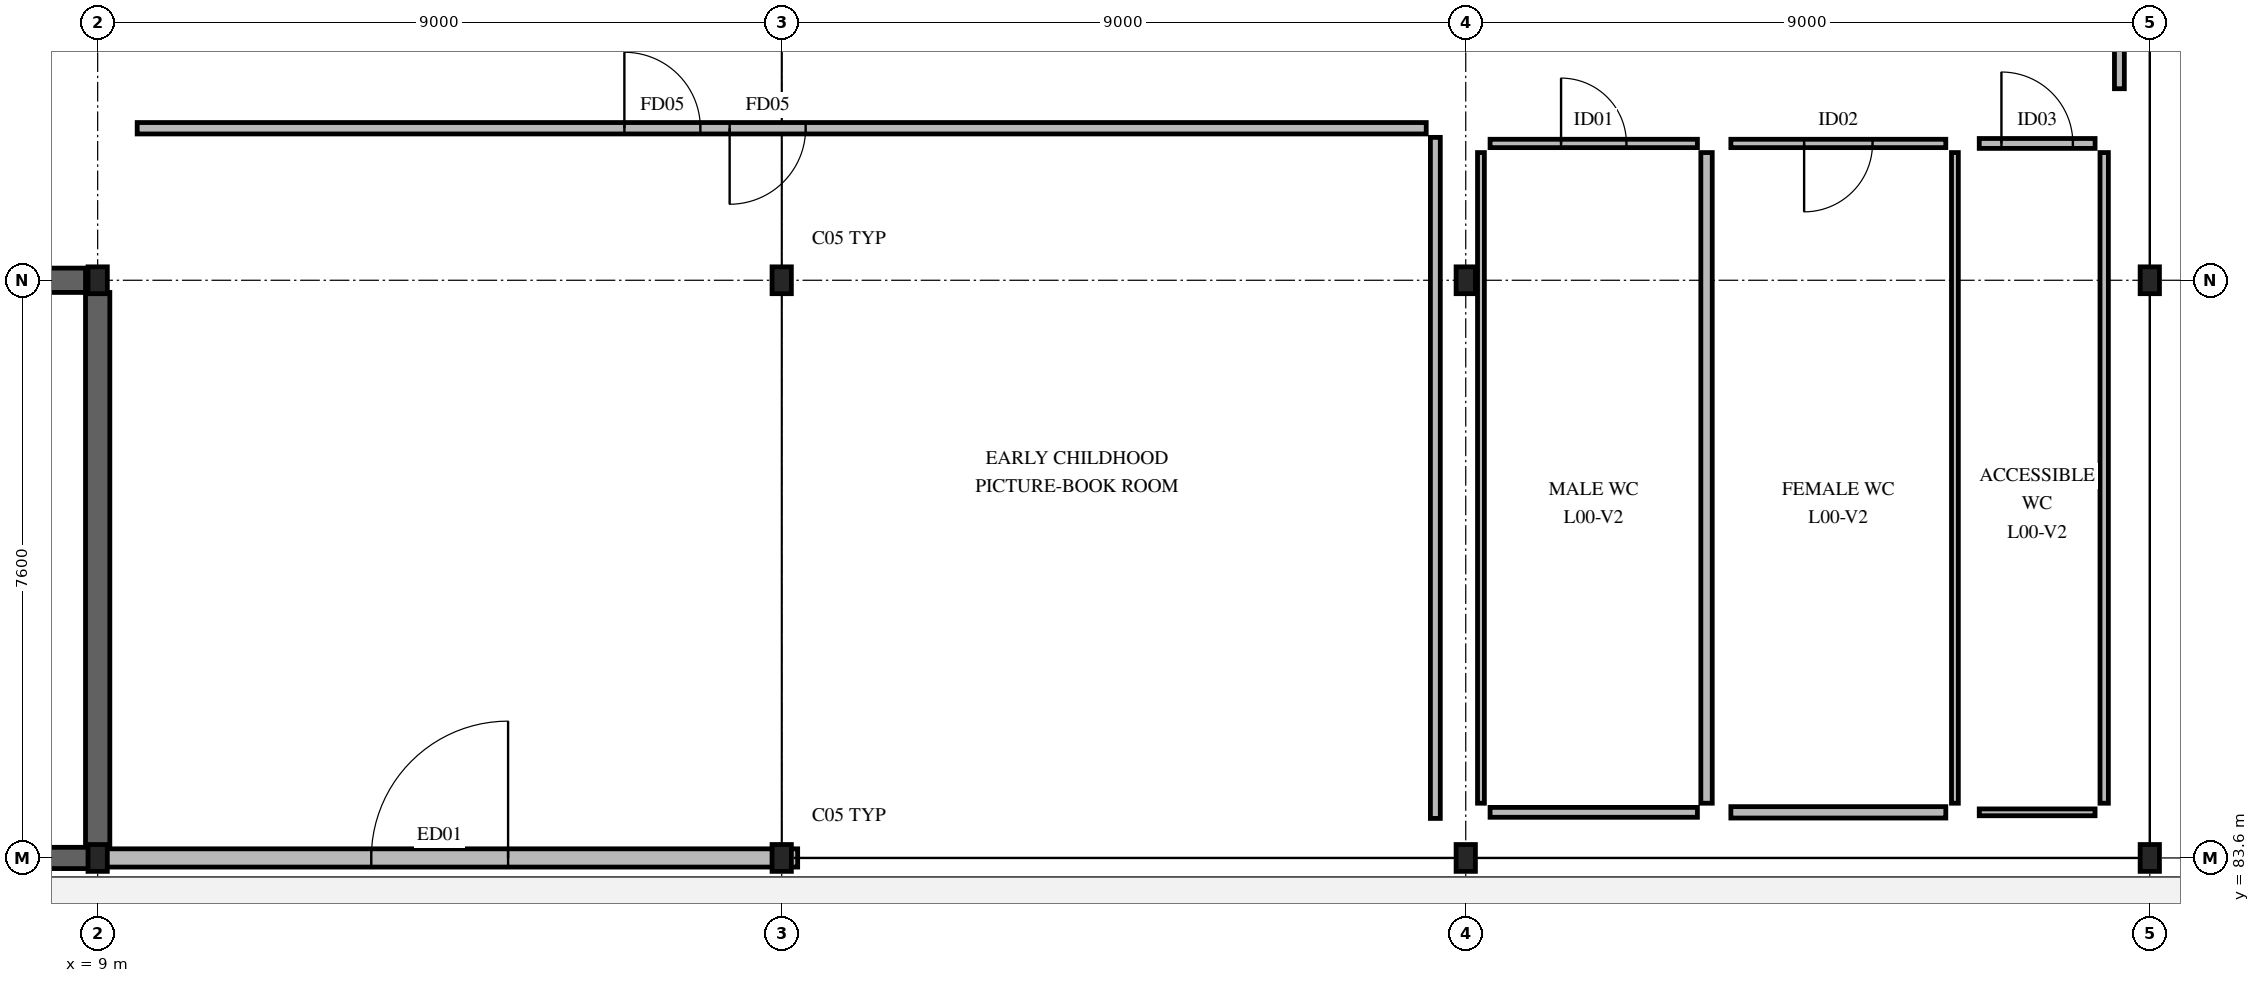
"""IFC4 building model, lengths in metres.
Left out: names, types, materials, properties, quantities, classifications, styles, units other than length and angle.
Written with IfcOpenShell. Run it as: python <this file> out.ifc"""

import sys

from ifc_helpers import new_model, si_unit, direction, frame, frame_2d, origin, origin_2d, place, context, subcontext, project, spatial, rectangle, i_section, extrude, element, fill, save


model = new_model("IFC4")
c1 = context("Model", 3, precision=1e-05, world=origin(), true_north=direction((0.0, 1.0)))
c2 = subcontext(c1, "Body", "Model", "MODEL_VIEW")
j1 = project(units=[si_unit("LENGTHUNIT", "METRE"), si_unit("PLANEANGLEUNIT", "RADIAN")], contexts=[c1])
p1 = place(None, origin())
s1 = spatial("IfcSite", under=j1, at=p1, CompositionType="ELEMENT")
p2 = place(p1, origin())
s2 = spatial("IfcBuilding", under=s1, at=p2, CompositionType="ELEMENT")
p3 = place(p2, origin())
s3 = spatial("IfcBuildingStorey", under=s2, at=p3, CompositionType="ELEMENT", Elevation=0.0)
for number, where, z_axis, x_axis in (
    (1, (9.0, 83.6, 0.0), (0.0, 0.0, 1.0), (1.0, 0.0, 0.0)),
    (2, (9.0, 91.2, 0.0), (0.0, 0.0, 1.0), (1.0, 0.0, 0.0)),
    (3, (18.0, 83.6, 0.0), (0.0, 0.0, 1.0), (1.0, 0.0, 0.0)),
    (4, (18.0, 91.2, 0.0), (0.0, 0.0, 1.0), (1.0, 0.0, 0.0)),
    (5, (27.0, 83.6, 0.0), (0.0, 0.0, 1.0), (1.0, 0.0, 0.0)),
    (6, (27.0, 91.2, 0.0), (0.0, 0.0, 1.0), (1.0, 0.0, 0.0)),
    (7, (36.0, 83.6, 0.0), (0.0, 0.0, 1.0), (1.0, 0.0, 0.0)),
    (8, (36.0, 91.2, 0.0), (0.0, 0.0, 1.0), (1.0, 0.0, 0.0)),
):
    element("IfcColumn", number, at=place(p3, frame(where, z_axis=z_axis, x_axis=x_axis)), inside=s3, PredefinedType="COLUMN", context=c2, shape_type="SweptSolid", body=[
        extrude(i_section(OverallWidth=0.254, OverallDepth=0.353, WebThickness=0.01, FlangeThickness=0.016, FilletRadius=0.015, at=origin_2d()), origin(), (0.0, 0.0, 1.0), 5.04),
    ])
p4 = place(p3, frame((0.0, 83.6, 0.0), z_axis=(0.0, 0.0, 1.0), x_axis=(1.0, 0.0, 0.0)))
e9 = element("IfcWall", 9, at=p4, inside=s3, PredefinedType="SOLIDWALL", context=c2, shape_type="SweptSolid", body=[
    extrude(rectangle(XDim=9.0, YDim=0.28, at=frame_2d((4.5, 0.0))), origin(), (0.0, 0.0, 1.0), 4.8),
])
p5 = place(p4, frame((0.32, 0.0, 0.0)))
e10 = element("IfcOpeningElement", 10, at=p5, cuts=e9, PredefinedType="OPENING", context=c2, shape_type="SweptSolid", body=[
    extrude(rectangle(XDim=1.15, YDim=2.2, at=frame_2d((0.575, 1.1))), frame((0.0, 0.15, 0.0), z_axis=(0.0, -1.0, 0.0), x_axis=(1.0, 0.0, 0.0)), (0.0, 0.0, 1.0), 0.3),
])
p6 = place(p3, frame((9.0, 83.6, 0.0), z_axis=(0.0, 0.0, 1.0), x_axis=(1.0, 0.0, 0.0)))
e11 = element("IfcWall", 11, at=p6, inside=s3, PredefinedType="STANDARD", context=c2, shape_type="SweptSolid", body=[
    extrude(rectangle(XDim=9.21, YDim=0.24, at=frame_2d((4.605, 0.0))), origin(), (0.0, 0.0, 1.0), 4.371),
])
p7 = place(p6, frame((3.6, 0.0, 0.0)))
e12 = element("IfcOpeningElement", 12, at=p7, cuts=e11, PredefinedType="OPENING", context=c2, shape_type="SweptSolid", body=[
    extrude(rectangle(XDim=1.8, YDim=2.25, at=frame_2d((0.9, 1.125))), frame((0.0, 0.13, 0.0), z_axis=(0.0, -1.0, 0.0), x_axis=(1.0, 0.0, 0.0)), (0.0, 0.0, 1.0), 0.26),
])
p8 = place(p3, frame((0.16, 91.2, 0.0), z_axis=(0.0, 0.0, 1.0), x_axis=(1.0, 0.0, 0.0)))
e13 = element("IfcWall", 13, at=p8, inside=s3, PredefinedType="SHEAR", context=c2, shape_type="SweptSolid", body=[
    extrude(rectangle(XDim=8.68, YDim=0.32, at=frame_2d((4.34, 0.0))), origin(), (0.0, 0.0, 1.0), 4.76),
])
p9 = place(p8, frame((2.2, 0.0, 0.0)))
e14 = element("IfcOpeningElement", 14, at=p9, cuts=e13, PredefinedType="OPENING", context=c2, shape_type="SweptSolid", body=[
    extrude(rectangle(XDim=1.0, YDim=2.15, at=frame_2d((0.5, 1.075))), frame((0.0, 0.17, 0.0), z_axis=(0.0, -1.0, 0.0), x_axis=(1.0, 0.0, 0.0)), (0.0, 0.0, 1.0), 0.34),
])
p10 = place(p3, frame((9.0, 83.76, 0.0), z_axis=(0.0, 0.0, 1.0), x_axis=(0.0, 1.0, 0.0)))
e15 = element("IfcWall", 15, at=p10, inside=s3, PredefinedType="SHEAR", context=c2, shape_type="SweptSolid", body=[
    extrude(rectangle(XDim=7.28, YDim=0.32, at=frame_2d((3.64, 0.0))), origin(), (0.0, 0.0, 1.0), 4.76),
])
p11 = place(p3, frame((9.52, 93.2, 0.0), z_axis=(0.0, 0.0, 1.0), x_axis=(1.0, 0.0, 0.0)))
e16 = element("IfcWall", 16, at=p11, inside=s3, PredefinedType="PARTITIONING", context=c2, shape_type="SweptSolid", body=[
    extrude(rectangle(XDim=16.96, YDim=0.15, at=frame_2d((8.48, 0.0))), origin(), (0.0, 0.0, 1.0), 4.76),
])
p12 = place(p11, frame((7.795, 0.0, 0.0)))
e17 = element("IfcOpeningElement", 17, at=p12, cuts=e16, PredefinedType="OPENING", context=c2, shape_type="SweptSolid", body=[
    extrude(rectangle(XDim=1.0, YDim=2.15, at=frame_2d((0.5, 1.075))), frame((0.0, 0.085, 0.0), z_axis=(0.0, -1.0, 0.0), x_axis=(1.0, 0.0, 0.0)), (0.0, 0.0, 1.0), 0.17),
])
p13 = place(p11, frame((6.41, 0.0, 0.0)))
e18 = element("IfcOpeningElement", 18, at=p13, cuts=e16, PredefinedType="OPENING", context=c2, shape_type="SweptSolid", body=[
    extrude(rectangle(XDim=1.0, YDim=2.15, at=frame_2d((0.5, 1.075))), frame((0.0, 0.085, 0.0), z_axis=(0.0, -1.0, 0.0), x_axis=(1.0, 0.0, 0.0)), (0.0, 0.0, 1.0), 0.17),
])
p14 = place(p3, frame((26.6, 84.12, 0.0), z_axis=(0.0, 0.0, 1.0), x_axis=(0.0, 1.0, 0.0)))
e19 = element("IfcWall", 19, at=p14, inside=s3, PredefinedType="PARTITIONING", context=c2, shape_type="SweptSolid", body=[
    extrude(rectangle(XDim=8.96, YDim=0.13, at=frame_2d((4.48, 0.0))), origin(), (0.0, 0.0, 1.0), 4.76),
])
p15 = place(p3, frame((27.32, 93.0, 0.0), z_axis=(0.0, 0.0, 1.0), x_axis=(1.0, 0.0, 0.0)))
e20 = element("IfcWall", 20, at=p15, inside=s3, PredefinedType="PARTITIONING", context=c2, shape_type="SweptSolid", body=[
    extrude(rectangle(XDim=2.728, YDim=0.11, at=frame_2d((1.364, 0.0))), origin(), (0.0, 0.0, 1.0), 4.76),
])
p16 = place(p15, frame((0.934, 0.0, 0.0)))
e21 = element("IfcOpeningElement", 21, at=p16, cuts=e20, PredefinedType="OPENING", context=c2, shape_type="SweptSolid", body=[
    extrude(rectangle(XDim=0.86, YDim=2.06, at=frame_2d((0.43, 1.03))), frame((0.0, 0.065, 0.0), z_axis=(0.0, -1.0, 0.0), x_axis=(1.0, 0.0, 0.0)), (0.0, 0.0, 1.0), 0.13),
])
p17 = place(p3, frame((27.2, 84.32, 0.0), z_axis=(0.0, 0.0, 1.0), x_axis=(0.0, 1.0, 0.0)))
e22 = element("IfcWall", 22, at=p17, inside=s3, PredefinedType="PARTITIONING", context=c2, shape_type="SweptSolid", body=[
    extrude(rectangle(XDim=8.56, YDim=0.09, at=frame_2d((4.28, 0.0))), origin(), (0.0, 0.0, 1.0), 4.76),
])
p18 = place(p3, frame((30.168, 84.32, 0.0), z_axis=(0.0, 0.0, 1.0), x_axis=(0.0, 1.0, 0.0)))
e23 = element("IfcWall", 23, at=p18, inside=s3, PredefinedType="PARTITIONING", context=c2, shape_type="SweptSolid", body=[
    extrude(rectangle(XDim=8.56, YDim=0.15, at=frame_2d((4.28, 0.0))), origin(), (0.0, 0.0, 1.0), 4.76),
])
p19 = place(p3, frame((27.32, 84.2, 0.0), z_axis=(0.0, 0.0, 1.0), x_axis=(1.0, 0.0, 0.0)))
e24 = element("IfcWall", 24, at=p19, inside=s3, PredefinedType="PARTITIONING", context=c2, shape_type="SweptSolid", body=[
    extrude(rectangle(XDim=2.728, YDim=0.13, at=frame_2d((1.364, 0.0))), origin(), (0.0, 0.0, 1.0), 4.76),
])
p20 = place(p3, frame((30.488, 93.0, 0.0), z_axis=(0.0, 0.0, 1.0), x_axis=(1.0, 0.0, 0.0)))
e25 = element("IfcWall", 25, at=p20, inside=s3, PredefinedType="PARTITIONING", context=c2, shape_type="SweptSolid", body=[
    extrude(rectangle(XDim=2.828, YDim=0.11, at=frame_2d((1.414, 0.0))), origin(), (0.0, 0.0, 1.0), 4.76),
])
p21 = place(p20, frame((0.964, 0.0, 0.0)))
e26 = element("IfcOpeningElement", 26, at=p21, cuts=e25, PredefinedType="OPENING", context=c2, shape_type="SweptSolid", body=[
    extrude(rectangle(XDim=0.9, YDim=2.06, at=frame_2d((0.45, 1.03))), frame((0.0, 0.065, 0.0), z_axis=(0.0, -1.0, 0.0), x_axis=(1.0, 0.0, 0.0)), (0.0, 0.0, 1.0), 0.13),
])
p22 = place(p3, frame((33.436, 84.32, 0.0), z_axis=(0.0, 0.0, 1.0), x_axis=(0.0, 1.0, 0.0)))
e27 = element("IfcWall", 27, at=p22, inside=s3, PredefinedType="PARTITIONING", context=c2, shape_type="SweptSolid", body=[
    extrude(rectangle(XDim=8.56, YDim=0.09, at=frame_2d((4.28, 0.0))), origin(), (0.0, 0.0, 1.0), 4.76),
])
p23 = place(p3, frame((30.488, 84.2, 0.0), z_axis=(0.0, 0.0, 1.0), x_axis=(1.0, 0.0, 0.0)))
e28 = element("IfcWall", 28, at=p23, inside=s3, PredefinedType="PARTITIONING", context=c2, shape_type="SweptSolid", body=[
    extrude(rectangle(XDim=2.828, YDim=0.15, at=frame_2d((1.414, 0.0))), origin(), (0.0, 0.0, 1.0), 4.76),
])
p24 = place(p3, frame((33.756, 93.0, 0.0), z_axis=(0.0, 0.0, 1.0), x_axis=(1.0, 0.0, 0.0)))
e29 = element("IfcWall", 29, at=p24, inside=s3, PredefinedType="PARTITIONING", context=c2, shape_type="SweptSolid", body=[
    extrude(rectangle(XDim=1.524, YDim=0.13, at=frame_2d((0.762, 0.0))), origin(), (0.0, 0.0, 1.0), 4.76),
])
p25 = place(p24, frame((0.292, 0.0, 0.0)))
e30 = element("IfcOpeningElement", 30, at=p25, cuts=e29, PredefinedType="OPENING", context=c2, shape_type="SweptSolid", body=[
    extrude(rectangle(XDim=0.94, YDim=2.06, at=frame_2d((0.47, 1.03))), frame((0.0, 0.075, 0.0), z_axis=(0.0, -1.0, 0.0), x_axis=(1.0, 0.0, 0.0)), (0.0, 0.0, 1.0), 0.15),
])
p26 = place(p3, frame((35.4, 84.32, 0.0), z_axis=(0.0, 0.0, 1.0), x_axis=(0.0, 1.0, 0.0)))
e31 = element("IfcWall", 31, at=p26, inside=s3, PredefinedType="PARTITIONING", context=c2, shape_type="SweptSolid", body=[
    extrude(rectangle(XDim=8.56, YDim=0.11, at=frame_2d((4.28, 0.0))), origin(), (0.0, 0.0, 1.0), 4.76),
])
p27 = place(p3, frame((33.756, 84.2, 0.0), z_axis=(0.0, 0.0, 1.0), x_axis=(1.0, 0.0, 0.0)))
e32 = element("IfcWall", 32, at=p27, inside=s3, PredefinedType="PARTITIONING", context=c2, shape_type="SweptSolid", body=[
    extrude(rectangle(XDim=1.524, YDim=0.09, at=frame_2d((0.762, 0.0))), origin(), (0.0, 0.0, 1.0), 4.76),
])
p28 = place(p3, frame((35.6, 93.72, 0.0), z_axis=(0.0, 0.0, 1.0), x_axis=(0.0, 1.0, 0.0)))
e33 = element("IfcWall", 33, at=p28, inside=s3, PredefinedType="PARTITIONING", context=c2, shape_type="SweptSolid", body=[
    extrude(rectangle(XDim=2.56, YDim=0.13, at=frame_2d((1.28, 0.0))), origin(), (0.0, 0.0, 1.0), 4.76),
])
p29 = place(p7, frame((1.8, 0.0, 0.0), z_axis=(0.0, 0.0, 1.0), x_axis=(-1.0, 0.0, 0.0)))
e34 = element("IfcDoor", 34, at=p29, inside=s3, OperationType="SINGLE_SWING_LEFT", PredefinedType="DOOR", context=c2, shape_type="SweptSolid", body=[
    extrude(rectangle(XDim=1.8, YDim=2.25, at=frame_2d((0.9, 1.125))), frame((0.0, 0.025, 0.0), z_axis=(0.0, -1.0, 0.0), x_axis=(1.0, 0.0, 0.0)), (0.0, 0.0, 1.0), 0.05),
])
fill(e12, e34)
p30 = place(p12, origin())
e35 = element("IfcDoor", 35, at=p30, inside=s3, OperationType="SINGLE_SWING_RIGHT", PredefinedType="DOOR", context=c2, shape_type="SweptSolid", body=[
    extrude(rectangle(XDim=1.0, YDim=2.15, at=frame_2d((0.5, 1.075))), frame((0.0, 0.025, 0.0), z_axis=(0.0, -1.0, 0.0), x_axis=(1.0, 0.0, 0.0)), (0.0, 0.0, 1.0), 0.05),
])
fill(e17, e35)
p31 = place(p16, origin())
e36 = element("IfcDoor", 36, at=p31, inside=s3, OperationType="SINGLE_SWING_LEFT", PredefinedType="DOOR", context=c2, shape_type="SweptSolid", body=[
    extrude(rectangle(XDim=0.86, YDim=2.06, at=frame_2d((0.43, 1.03))), frame((0.0, 0.025, 0.0), z_axis=(0.0, -1.0, 0.0), x_axis=(1.0, 0.0, 0.0)), (0.0, 0.0, 1.0), 0.05),
])
fill(e21, e36)
p32 = place(p21, origin())
e37 = element("IfcDoor", 37, at=p32, inside=s3, OperationType="SINGLE_SWING_RIGHT", PredefinedType="DOOR", context=c2, shape_type="SweptSolid", body=[
    extrude(rectangle(XDim=0.9, YDim=2.06, at=frame_2d((0.45, 1.03))), frame((0.0, 0.025, 0.0), z_axis=(0.0, -1.0, 0.0), x_axis=(1.0, 0.0, 0.0)), (0.0, 0.0, 1.0), 0.05),
])
fill(e26, e37)
p33 = place(p25, origin())
e38 = element("IfcDoor", 38, at=p33, inside=s3, OperationType="SINGLE_SWING_LEFT", PredefinedType="DOOR", context=c2, shape_type="SweptSolid", body=[
    extrude(rectangle(XDim=0.94, YDim=2.06, at=frame_2d((0.47, 1.03))), frame((0.0, 0.025, 0.0), z_axis=(0.0, -1.0, 0.0), x_axis=(1.0, 0.0, 0.0)), (0.0, 0.0, 1.0), 0.05),
])
fill(e30, e38)
p34 = place(p13, origin())
e39 = element("IfcDoor", 39, at=p34, inside=s3, OperationType="SINGLE_SWING_LEFT", PredefinedType="DOOR", context=c2, shape_type="SweptSolid", body=[
    extrude(rectangle(XDim=1.0, YDim=2.15, at=frame_2d((0.5, 1.075))), frame((0.0, 0.025, 0.0), z_axis=(0.0, -1.0, 0.0), x_axis=(1.0, 0.0, 0.0)), (0.0, 0.0, 1.0), 0.05),
])
fill(e18, e39)
save(model, sys.argv[1])
